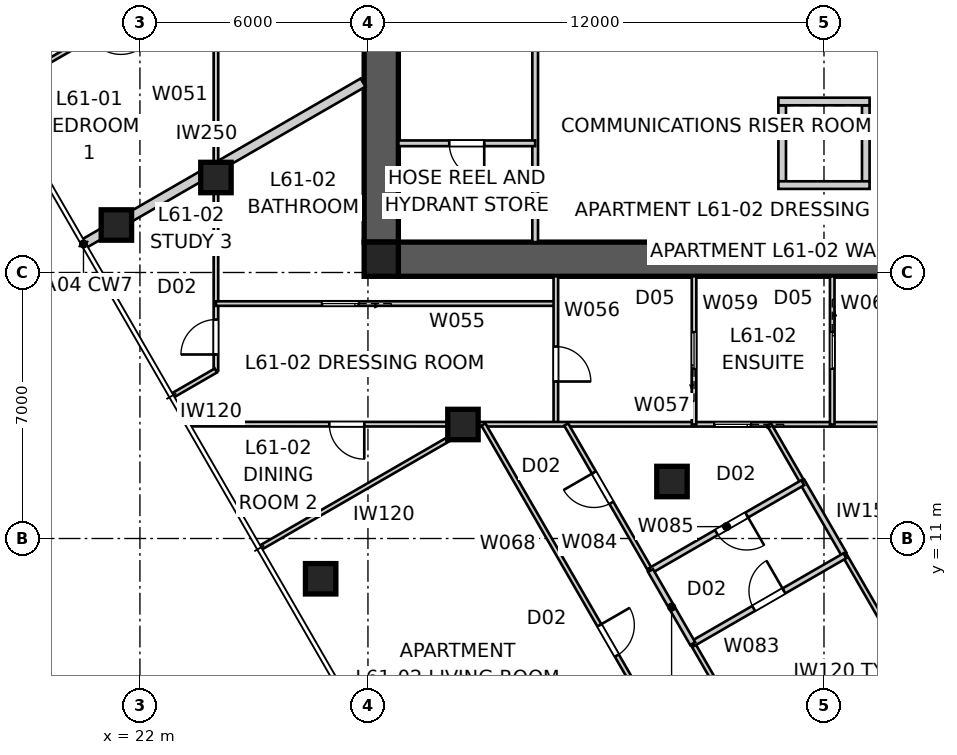
"""IFC4 building model, lengths in metres.
Left out: names, types, materials, properties, quantities, classifications, styles, units other than length and angle.
Written with IfcOpenShell. Run it as: python <this file> out.ifc"""

import sys

from ifc_helpers import new_model, si_unit, direction, frame, frame_2d, origin, origin_2d, place, context, subcontext, project, spatial, polyline, rectangle, outline, extrude, element, fill, save


model = new_model("IFC4")
c1 = context("Model", 3, precision=1e-05, world=origin(), true_north=direction((0.0, 1.0)))
c2 = subcontext(c1, "Body", "Model", "MODEL_VIEW")
j1 = project(units=[si_unit("LENGTHUNIT", "METRE"), si_unit("PLANEANGLEUNIT", "RADIAN")], contexts=[c1])
p1 = place(None, origin())
s1 = spatial("IfcSite", under=j1, at=p1, CompositionType="ELEMENT")
p2 = place(p1, origin())
s2 = spatial("IfcBuilding", under=s1, at=p2, CompositionType="ELEMENT")
p3 = place(p2, frame((0.0, 0.0, 221.8)))
s3 = spatial("IfcBuildingStorey", under=s2, at=p3, CompositionType="ELEMENT", Elevation=221.8)
p4 = place(p3, frame((51.2, 18.35, 0.0), z_axis=(0.0, 0.0, 1.0), x_axis=(-1.0, 0.0, 0.0)))
e1 = element("IfcWall", 1, at=p4, inside=s3, PredefinedType="SHEAR", context=c2, shape_type="SweptSolid", body=[
    extrude(outline(polyline([(0.0, -0.45), (22.4, -0.45), (22.4, -0.025), (22.85, -0.025), (22.85, 0.025), (22.4, 0.025), (22.4, 0.45), (0.0, 0.45), (0.0, 0.025), (-0.45, 0.025), (-0.45, -0.025), (0.0, -0.025), (0.0, -0.45)])), origin(), (0.0, 0.0, 1.0), 3.4),
])
p5 = place(p3, frame((28.35, 41.2, 0.0), z_axis=(0.0, 0.0, 1.0), x_axis=(0.0, -1.0, 0.0)))
e2 = element("IfcWall", 2, at=p5, inside=s3, PredefinedType="SHEAR", context=c2, shape_type="SweptSolid", body=[
    extrude(outline(polyline([(0.0, -0.45), (22.4, -0.45), (22.4, -0.025), (22.85, -0.025), (22.85, 0.025), (22.4, 0.025), (22.4, 0.45), (0.0, 0.45), (0.0, 0.025), (-0.45, 0.025), (-0.45, -0.025), (0.0, -0.025), (0.0, -0.45)])), origin(), (0.0, 0.0, 1.0), 3.4),
])
p6 = place(p5, frame((11.14, 0.0, 0.0)))
e3 = element("IfcOpeningElement", 3, at=p6, cuts=e2, PredefinedType="OPENING", context=c2, shape_type="SweptSolid", body=[
    extrude(rectangle(XDim=1.02, YDim=2.4, at=frame_2d((0.51, 1.2))), frame((0.0, 0.46, 0.0), z_axis=(0.0, -1.0, 0.0), x_axis=(1.0, 0.0, 0.0)), (0.0, 0.0, 1.0), 0.92),
])
for number, where, z_axis, x_axis in (
    (4, (38.9, 22.4, 0.0), (0.0, 0.0, 1.0), (0.0, -1.0, 0.0)),
    (5, (41.1, 22.4, 0.0), (0.0, 0.0, 1.0), (0.0, -1.0, 0.0)),
):
    element("IfcWall", number, at=place(p3, frame(where, z_axis=z_axis, x_axis=x_axis)), inside=s3, PredefinedType="SOLIDWALL", context=c2, shape_type="SweptSolid", body=[
        extrude(rectangle(XDim=2.0, YDim=0.2, at=frame_2d((1.0, 0.0))), origin(), (0.0, 0.0, 1.0), 3.4),
    ])
for number, where, z_axis, x_axis in (
    (6, (38.8, 22.5, 0.0), (0.0, 0.0, 1.0), (1.0, 0.0, 0.0)),
    (7, (38.8, 20.3, 0.0), (0.0, 0.0, 1.0), (1.0, 0.0, 0.0)),
):
    element("IfcWall", number, at=place(p3, frame(where, z_axis=z_axis, x_axis=x_axis)), inside=s3, PredefinedType="SOLIDWALL", context=c2, shape_type="SweptSolid", body=[
        extrude(rectangle(XDim=2.4, YDim=0.2, at=frame_2d((1.2, 0.0))), origin(), (0.0, 0.0, 1.0), 3.4),
    ])
p7 = place(p3, frame((28.35, 18.35, 0.0), z_axis=(0.0, 0.0, 1.0), x_axis=(1.0, 0.0, 0.0)))
e8 = element("IfcColumn", 8, at=p7, inside=s3, PredefinedType="COLUMN", context=c2, shape_type="SweptSolid", body=[
    extrude(rectangle(XDim=0.9, YDim=0.9, at=origin_2d()), origin(), (0.0, 0.0, 1.0), 3.4),
])
for number, where, z_axis, x_axis in (
    (9, (21.38, 19.25, 0.0), (0.0, 0.0, 1.0), (1.0, 0.0, 0.0)),
    (10, (26.755, 9.94, 0.0), (0.0, 0.0, 1.0), (1.0, 0.0, 0.0)),
    (11, (24.0, 20.5, 0.0), (0.0, 0.0, 1.0), (1.0, 0.0, 0.0)),
    (12, (30.5, 14.0, 0.0), (0.0, 0.0, 1.0), (1.0, 0.0, 0.0)),
    (13, (36.0, 12.5, 0.0), (0.0, 0.0, 1.0), (1.0, 0.0, 0.0)),
):
    element("IfcColumn", number, at=place(p3, frame(where, z_axis=z_axis, x_axis=x_axis)), inside=s3, PredefinedType="COLUMN", context=c2, shape_type="SweptSolid", body=[
        extrude(rectangle(XDim=0.8, YDim=0.8, at=origin_2d()), origin(), (0.0, 0.0, 1.0), 3.4),
    ])
p8 = place(p3, frame((20.514, 18.75, 0.0), z_axis=(0.0, 0.0, 1.0), x_axis=(0.866020489494, 0.500008511703, 0.0)))
e14 = element("IfcWall", 14, at=p8, inside=s3, PredefinedType="PARTITIONING", context=c2, shape_type="SweptSolid", body=[
    extrude(rectangle(XDim=8.496, YDim=0.25, at=frame_2d((4.248, 0.0))), origin(), (0.0, 0.0, 1.0), 3.25),
])
p9 = place(p3, frame((32.4, 18.8, 0.0), z_axis=(0.0, 0.0, 1.0), x_axis=(0.0, 1.0, 0.0)))
e15 = element("IfcWall", 15, at=p9, inside=s3, PredefinedType="SOLIDWALL", context=c2, shape_type="SweptSolid", body=[
    extrude(rectangle(XDim=5.9, YDim=0.15, at=frame_2d((2.95, 0.0))), origin(), (0.0, 0.0, 1.0), 3.25),
])
p10 = place(p3, frame((32.4, 21.4, 0.0), z_axis=(0.0, 0.0, 1.0), x_axis=(-1.0, 0.0, 0.0)))
e16 = element("IfcWall", 16, at=p10, inside=s3, PredefinedType="SOLIDWALL", context=c2, shape_type="SweptSolid", body=[
    extrude(rectangle(XDim=3.6, YDim=0.15, at=frame_2d((1.8, 0.0))), origin(), (0.0, 0.0, 1.0), 3.25),
])
p11 = place(p10, frame((1.34, 0.0, 0.0)))
e17 = element("IfcOpeningElement", 17, at=p11, cuts=e16, PredefinedType="OPENING", context=c2, shape_type="SweptSolid", body=[
    extrude(rectangle(XDim=0.92, YDim=2.1, at=frame_2d((0.46, 1.05))), frame((0.0, 0.085, 0.0), z_axis=(0.0, -1.0, 0.0), x_axis=(1.0, 0.0, 0.0)), (0.0, 0.0, 1.0), 0.17),
])
p12 = place(p3, frame((24.0, 15.422, 0.0), z_axis=(0.0, 0.0, 1.0), x_axis=(0.0, 1.0, 0.0)))
e18 = element("IfcWall", 18, at=p12, inside=s3, PredefinedType="PARTITIONING", context=c2, shape_type="SweptSolid", body=[
    extrude(rectangle(XDim=26.045, YDim=0.12, at=frame_2d((13.022, 0.0))), origin(), (0.0, 0.0, 1.0), 2.55),
])
p13 = place(p12, frame((13.139, 0.0, 0.0)))
e19 = element("IfcOpeningElement", 19, at=p13, cuts=e18, PredefinedType="OPENING", context=c2, shape_type="SweptSolid", body=[
    extrude(rectangle(XDim=0.92, YDim=2.34, at=frame_2d((0.46, 1.17))), frame((0.0, 0.07, 0.0), z_axis=(0.0, -1.0, 0.0), x_axis=(1.0, 0.0, 0.0)), (0.0, 0.0, 1.0), 0.14),
])
p14 = place(p12, frame((20.573, 0.0, 0.0)))
e20 = element("IfcOpeningElement", 20, at=p14, cuts=e18, PredefinedType="OPENING", context=c2, shape_type="SweptSolid", body=[
    extrude(rectangle(XDim=0.92, YDim=2.34, at=frame_2d((0.46, 1.17))), frame((0.0, 0.07, 0.0), z_axis=(0.0, -1.0, 0.0), x_axis=(1.0, 0.0, 0.0)), (0.0, 0.0, 1.0), 0.14),
])
p15 = place(p12, frame((0.42, 0.0, 0.0)))
e21 = element("IfcOpeningElement", 21, at=p15, cuts=e18, PredefinedType="OPENING", context=c2, shape_type="SweptSolid", body=[
    extrude(rectangle(XDim=0.92, YDim=2.34, at=frame_2d((0.46, 1.17))), frame((0.0, 0.07, 0.0), z_axis=(0.0, -1.0, 0.0), x_axis=(1.0, 0.0, 0.0)), (0.0, 0.0, 1.0), 0.14),
])
p16 = place(p3, frame((24.0, 26.103, 0.0), z_axis=(0.0, 0.0, 1.0), x_axis=(-0.866017585169, -0.500013541994, 0.0)))
e22 = element("IfcWall", 22, at=p16, inside=s3, PredefinedType="PARTITIONING", context=c2, shape_type="SweptSolid", body=[
    extrude(rectangle(XDim=6.655, YDim=0.12, at=frame_2d((3.328, 0.0))), origin(), (0.0, 0.0, 1.0), 3.25),
])
p17 = place(p16, frame((2.887, 0.0, 0.0)))
e23 = element("IfcOpeningElement", 23, at=p17, cuts=e22, PredefinedType="OPENING", context=c2, shape_type="SweptSolid", body=[
    extrude(rectangle(XDim=0.92, YDim=2.34, at=frame_2d((0.46, 1.17))), frame((0.0, 0.07, 0.0), z_axis=(0.0, -1.0, 0.0), x_axis=(1.0, 0.0, 0.0)), (0.0, 0.0, 1.0), 0.14),
])
p18 = place(p3, frame((32.944, 17.183, 0.0), z_axis=(0.0, 0.0, 1.0), x_axis=(-1.0, 0.0, 0.0)))
e24 = element("IfcWall", 24, at=p18, inside=s3, PredefinedType="PARTITIONING", context=c2, shape_type="SweptSolid", body=[
    extrude(rectangle(XDim=8.944, YDim=0.12, at=frame_2d((4.472, 0.0))), origin(), (0.0, 0.0, 1.0), 3.25),
])
p19 = place(p18, frame((5.192, 0.0, 0.0)))
e25 = element("IfcOpeningElement", 25, at=p19, cuts=e24, PredefinedType="OPENING", context=c2, shape_type="SweptSolid", body=[
    extrude(rectangle(XDim=0.96, YDim=2.1, at=frame_2d((0.48, 1.05))), frame((0.0, 0.07, 0.0), z_axis=(0.0, -1.0, 0.0), x_axis=(1.0, 0.0, 0.0)), (0.0, 0.0, 1.0), 0.14),
])
p20 = place(p3, frame((32.944, 17.9, 0.0), z_axis=(0.0, 0.0, 1.0), x_axis=(0.0, -1.0, 0.0)))
e26 = element("IfcWall", 26, at=p20, inside=s3, PredefinedType="PARTITIONING", context=c2, shape_type="SweptSolid", body=[
    extrude(rectangle(XDim=3.9, YDim=0.12, at=frame_2d((1.95, 0.0))), origin(), (0.0, 0.0, 1.0), 3.25),
])
p21 = place(p20, frame((1.849, 0.0, 0.0)))
e27 = element("IfcOpeningElement", 27, at=p21, cuts=e26, PredefinedType="OPENING", context=c2, shape_type="SweptSolid", body=[
    extrude(rectangle(XDim=0.92, YDim=2.34, at=frame_2d((0.46, 1.17))), frame((0.0, 0.07, 0.0), z_axis=(0.0, -1.0, 0.0), x_axis=(1.0, 0.0, 0.0)), (0.0, 0.0, 1.0), 0.14),
])
p22 = place(p3, frame((51.757, 14.0, 0.0), z_axis=(0.0, 0.0, 1.0), x_axis=(-0.999999938148, 0.000351716958, 0.0)))
e28 = element("IfcWall", 28, at=p22, inside=s3, PredefinedType="PARTITIONING", context=c2, shape_type="SweptSolid", body=[
    extrude(rectangle(XDim=28.46, YDim=0.12, at=frame_2d((14.23, 0.0))), origin(), (0.0, 0.0, 1.0), 2.55),
])
p23 = place(p22, frame((3.82, 0.0, 0.0)))
e29 = element("IfcOpeningElement", 29, at=p23, cuts=e28, PredefinedType="OPENING", context=c2, shape_type="SweptSolid", body=[
    extrude(rectangle(XDim=0.92, YDim=2.34, at=frame_2d((0.46, 1.17))), frame((0.0, 0.07, 0.0), z_axis=(0.0, -1.0, 0.0), x_axis=(1.0, 0.0, 0.0)), (0.0, 0.0, 1.0), 0.14),
])
p24 = place(p22, frame((9.17, 0.0, 0.0)))
e30 = element("IfcOpeningElement", 30, at=p24, cuts=e28, PredefinedType="OPENING", context=c2, shape_type="SweptSolid", body=[
    extrude(rectangle(XDim=0.96, YDim=2.1, at=frame_2d((0.48, 1.05))), frame((0.0, 0.07, 0.0), z_axis=(0.0, -1.0, 0.0), x_axis=(1.0, 0.0, 0.0)), (0.0, 0.0, 1.0), 0.14),
])
p25 = place(p22, frame((13.68, 0.0, 0.0)))
e31 = element("IfcOpeningElement", 31, at=p25, cuts=e28, PredefinedType="OPENING", context=c2, shape_type="SweptSolid", body=[
    extrude(rectangle(XDim=0.96, YDim=2.1, at=frame_2d((0.48, 1.05))), frame((0.0, 0.07, 0.0), z_axis=(0.0, -1.0, 0.0), x_axis=(1.0, 0.0, 0.0)), (0.0, 0.0, 1.0), 0.14),
])
p26 = place(p22, frame((23.854, 0.0, 0.0)))
e32 = element("IfcOpeningElement", 32, at=p26, cuts=e28, PredefinedType="OPENING", context=c2, shape_type="SweptSolid", body=[
    extrude(rectangle(XDim=0.92, YDim=2.34, at=frame_2d((0.46, 1.17))), frame((0.0, 0.07, 0.0), z_axis=(0.0, -1.0, 0.0), x_axis=(1.0, 0.0, 0.0)), (0.0, 0.0, 1.0), 0.14),
])
p27 = place(p3, frame((22.862, 14.765, 0.0), z_axis=(0.0, 0.0, 1.0), x_axis=(0.866040225545, 0.499974327079, 0.0)))
e33 = element("IfcWall", 33, at=p27, inside=s3, PredefinedType="PARTITIONING", context=c2, shape_type="SweptSolid", body=[
    extrude(rectangle(XDim=1.314, YDim=0.12, at=frame_2d((0.657, 0.0))), origin(), (0.0, 0.0, 1.0), 3.25),
])
p28 = place(p3, frame((36.581, 14.0, 0.0), z_axis=(0.0, 0.0, 1.0), x_axis=(0.0, 1.0, 0.0)))
e34 = element("IfcWall", 34, at=p28, inside=s3, PredefinedType="PARTITIONING", context=c2, shape_type="SweptSolid", body=[
    extrude(rectangle(XDim=3.9, YDim=0.12, at=frame_2d((1.95, 0.0))), origin(), (0.0, 0.0, 1.0), 3.25),
])
p29 = place(p28, frame((1.47, 0.0, 0.0)))
e35 = element("IfcOpeningElement", 35, at=p29, cuts=e34, PredefinedType="OPENING", context=c2, shape_type="SweptSolid", body=[
    extrude(rectangle(XDim=0.96, YDim=2.1, at=frame_2d((0.48, 1.05))), frame((0.0, 0.07, 0.0), z_axis=(0.0, -1.0, 0.0), x_axis=(1.0, 0.0, 0.0)), (0.0, 0.0, 1.0), 0.14),
])
p30 = place(p3, frame((40.217, 17.9, 0.0), z_axis=(0.0, 0.0, 1.0), x_axis=(0.0, -1.0, 0.0)))
e36 = element("IfcWall", 36, at=p30, inside=s3, PredefinedType="PARTITIONING", context=c2, shape_type="SweptSolid", body=[
    extrude(rectangle(XDim=3.9, YDim=0.12, at=frame_2d((1.95, 0.0))), origin(), (0.0, 0.0, 1.0), 3.25),
])
p31 = place(p30, frame((1.47, 0.0, 0.0)))
e37 = element("IfcOpeningElement", 37, at=p31, cuts=e36, PredefinedType="OPENING", context=c2, shape_type="SweptSolid", body=[
    extrude(rectangle(XDim=0.96, YDim=2.1, at=frame_2d((0.48, 1.05))), frame((0.0, 0.07, 0.0), z_axis=(0.0, -1.0, 0.0), x_axis=(1.0, 0.0, 0.0)), (0.0, 0.0, 1.0), 0.14),
])
p32 = place(p3, frame((31.039, 14.0, 0.0), z_axis=(0.0, 0.0, 1.0), x_axis=(0.500006184843, -0.866021832934, 0.0)))
e38 = element("IfcWall", 38, at=p32, inside=s3, PredefinedType="PARTITIONING", context=c2, shape_type="SweptSolid", body=[
    extrude(rectangle(XDim=13.084, YDim=0.12, at=frame_2d((6.542, 0.0))), origin(), (0.0, 0.0, 1.0), 3.25),
])
p33 = place(p32, frame((6.102, 0.0, 0.0)))
e39 = element("IfcOpeningElement", 39, at=p33, cuts=e38, PredefinedType="OPENING", context=c2, shape_type="SweptSolid", body=[
    extrude(rectangle(XDim=0.92, YDim=2.34, at=frame_2d((0.46, 1.17))), frame((0.0, 0.07, 0.0), z_axis=(0.0, -1.0, 0.0), x_axis=(1.0, 0.0, 0.0)), (0.0, 0.0, 1.0), 0.14),
])
p34 = place(p3, frame((25.174, 10.759, 0.0), z_axis=(0.0, 0.0, 1.0), x_axis=(0.866023120914, 0.500003954026, 0.0)))
e40 = element("IfcWall", 40, at=p34, inside=s3, PredefinedType="PARTITIONING", context=c2, shape_type="SweptSolid", body=[
    extrude(rectangle(XDim=6.481, YDim=0.12, at=frame_2d((3.241, 0.0))), origin(), (0.0, 0.0, 1.0), 3.25),
])
p35 = place(p3, frame((43.219, 5.924, 0.0), z_axis=(0.0, 0.0, 1.0), x_axis=(-0.500003544594, 0.866023357302, 0.0)))
e41 = element("IfcWall", 41, at=p35, inside=s3, PredefinedType="PARTITIONING", context=c2, shape_type="SweptSolid", body=[
    extrude(rectangle(XDim=5.388, YDim=0.12, at=frame_2d((2.694, 0.0))), origin(), (0.0, 0.0, 1.0), 3.25),
])
p36 = place(p3, frame((39.416, 12.512, 0.0), z_axis=(0.0, 0.0, 1.0), x_axis=(-0.500005339912, 0.866022320763, 0.0)))
e42 = element("IfcWall", 42, at=p36, inside=s3, PredefinedType="PARTITIONING", context=c2, shape_type="SweptSolid", body=[
    extrude(rectangle(XDim=1.718, YDim=0.12, at=frame_2d((0.859, 0.0))), origin(), (0.0, 0.0, 1.0), 3.25),
])
p37 = place(p3, frame((40.525, 10.59, 0.0), z_axis=(0.0, 0.0, 1.0), x_axis=(-0.499973265211, 0.866040838572, 0.0)))
e43 = element("IfcWall", 43, at=p37, inside=s3, PredefinedType="SOLIDWALL", context=c2, shape_type="SweptSolid", body=[
    extrude(rectangle(XDim=2.219, YDim=0.15, at=frame_2d((1.109, 0.0))), origin(), (0.0, 0.0, 1.0), 3.25),
])
p38 = place(p3, frame((39.214, 3.612, 0.0), z_axis=(0.0, 0.0, 1.0), x_axis=(-0.499995631649, 0.866027925839, 0.0)))
e44 = element("IfcWall", 44, at=p38, inside=s3, PredefinedType="PARTITIONING", context=c2, shape_type="SweptSolid", body=[
    extrude(rectangle(XDim=5.338, YDim=0.12, at=frame_2d((2.669, 0.0))), origin(), (0.0, 0.0, 1.0), 3.25),
])
p39 = place(p3, frame((36.545, 8.234, 0.0), z_axis=(0.0, 0.0, 1.0), x_axis=(0.866025598446, 0.499999662836, 0.0)))
e45 = element("IfcWall", 45, at=p39, inside=s3, PredefinedType="SOLIDWALL", context=c2, shape_type="SweptSolid", body=[
    extrude(rectangle(XDim=4.625, YDim=0.15, at=frame_2d((2.312, 0.0))), origin(), (0.0, 0.0, 1.0), 3.25),
])
p40 = place(p39, frame((1.853, 0.0, 0.0)))
e46 = element("IfcOpeningElement", 46, at=p40, cuts=e45, PredefinedType="OPENING", context=c2, shape_type="SweptSolid", body=[
    extrude(rectangle(XDim=0.92, YDim=2.34, at=frame_2d((0.46, 1.17))), frame((0.0, 0.085, 0.0), z_axis=(0.0, -1.0, 0.0), x_axis=(1.0, 0.0, 0.0)), (0.0, 0.0, 1.0), 0.17),
])
p41 = place(p3, frame((35.435, 10.156, 0.0), z_axis=(0.0, 0.0, 1.0), x_axis=(-0.499966886051, 0.866044521288, 0.0)))
e47 = element("IfcWall", 47, at=p41, inside=s3, PredefinedType="PARTITIONING", context=c2, shape_type="SweptSolid", body=[
    extrude(rectangle(XDim=4.438, YDim=0.12, at=frame_2d((2.219, 0.0))), origin(), (0.0, 0.0, 1.0), 3.25),
])
p42 = place(p41, frame((2.059, 0.0, 0.0)))
e48 = element("IfcOpeningElement", 48, at=p42, cuts=e47, PredefinedType="OPENING", context=c2, shape_type="SweptSolid", body=[
    extrude(rectangle(XDim=0.92, YDim=2.34, at=frame_2d((0.46, 1.17))), frame((0.0, 0.07, 0.0), z_axis=(0.0, -1.0, 0.0), x_axis=(1.0, 0.0, 0.0)), (0.0, 0.0, 1.0), 0.14),
])
p43 = place(p3, frame((39.441, 12.469, 0.0), z_axis=(0.0, 0.0, 1.0), x_axis=(-0.866025598446, -0.499999662836, 0.0)))
e49 = element("IfcWall", 49, at=p43, inside=s3, PredefinedType="SOLIDWALL", context=c2, shape_type="SweptSolid", body=[
    extrude(rectangle(XDim=4.625, YDim=0.15, at=frame_2d((2.312, 0.0))), origin(), (0.0, 0.0, 1.0), 3.25),
])
p44 = place(p43, frame((1.702, 0.0, 0.0)))
e50 = element("IfcOpeningElement", 50, at=p44, cuts=e49, PredefinedType="OPENING", context=c2, shape_type="SweptSolid", body=[
    extrude(rectangle(XDim=0.92, YDim=2.34, at=frame_2d((0.46, 1.17))), frame((0.0, 0.085, 0.0), z_axis=(0.0, -1.0, 0.0), x_axis=(1.0, 0.0, 0.0)), (0.0, 0.0, 1.0), 0.17),
])
p45 = place(p3, frame((35.435, 10.156, 0.0), z_axis=(0.0, 0.0, 1.0), x_axis=(0.500008142102, -0.866020702889, 0.0)))
e51 = element("IfcWall", 51, at=p45, inside=s3, PredefinedType="SOLIDWALL", context=c2, shape_type="SweptSolid", body=[
    extrude(rectangle(XDim=2.219, YDim=0.15, at=frame_2d((1.11, 0.0))), origin(), (0.0, 0.0, 1.0), 3.25),
])
p46 = place(p11, origin())
e52 = element("IfcDoor", 52, at=p46, inside=s3, OperationType="SINGLE_SWING_LEFT", PredefinedType="DOOR", context=c2, shape_type="SweptSolid", body=[
    extrude(rectangle(XDim=0.92, YDim=2.1, at=frame_2d((0.46, 1.05))), frame((0.0, 0.025, 0.0), z_axis=(0.0, -1.0, 0.0), x_axis=(1.0, 0.0, 0.0)), (0.0, 0.0, 1.0), 0.05),
])
fill(e17, e52)
p47 = place(p31, origin())
e53 = element("IfcDoor", 53, at=p47, inside=s3, OperationType="SLIDING_TO_LEFT", PredefinedType="DOOR", context=c2, shape_type="SweptSolid", body=[
    extrude(rectangle(XDim=0.96, YDim=2.1, at=frame_2d((0.48, 1.05))), frame((0.0, 0.025, 0.0), z_axis=(0.0, -1.0, 0.0), x_axis=(1.0, 0.0, 0.0)), (0.0, 0.0, 1.0), 0.05),
])
fill(e37, e53)
p48 = place(p29, origin())
e54 = element("IfcDoor", 54, at=p48, inside=s3, OperationType="SLIDING_TO_LEFT", PredefinedType="DOOR", context=c2, shape_type="SweptSolid", body=[
    extrude(rectangle(XDim=0.96, YDim=2.1, at=frame_2d((0.48, 1.05))), frame((0.0, 0.025, 0.0), z_axis=(0.0, -1.0, 0.0), x_axis=(1.0, 0.0, 0.0)), (0.0, 0.0, 1.0), 0.05),
])
fill(e35, e54)
p49 = place(p25, origin())
e55 = element("IfcDoor", 55, at=p49, inside=s3, OperationType="SLIDING_TO_LEFT", PredefinedType="DOOR", context=c2, shape_type="SweptSolid", body=[
    extrude(rectangle(XDim=0.96, YDim=2.1, at=frame_2d((0.48, 1.05))), frame((0.0, 0.025, 0.0), z_axis=(0.0, -1.0, 0.0), x_axis=(1.0, 0.0, 0.0)), (0.0, 0.0, 1.0), 0.05),
])
fill(e31, e55)
p50 = place(p21, origin())
e56 = element("IfcDoor", 56, at=p50, inside=s3, OperationType="SINGLE_SWING_RIGHT", PredefinedType="DOOR", context=c2, shape_type="SweptSolid", body=[
    extrude(rectangle(XDim=0.92, YDim=2.34, at=frame_2d((0.46, 1.17))), frame((0.0, 0.025, 0.0), z_axis=(0.0, -1.0, 0.0), x_axis=(1.0, 0.0, 0.0)), (0.0, 0.0, 1.0), 0.05),
])
fill(e27, e56)
p51 = place(p44, origin())
e57 = element("IfcDoor", 57, at=p51, inside=s3, OperationType="SINGLE_SWING_LEFT", PredefinedType="DOOR", context=c2, shape_type="SweptSolid", body=[
    extrude(rectangle(XDim=0.92, YDim=2.34, at=frame_2d((0.46, 1.17))), frame((0.0, 0.025, 0.0), z_axis=(0.0, -1.0, 0.0), x_axis=(1.0, 0.0, 0.0)), (0.0, 0.0, 1.0), 0.05),
])
fill(e50, e57)
p52 = place(p42, origin())
e58 = element("IfcDoor", 58, at=p52, inside=s3, OperationType="SINGLE_SWING_RIGHT", PredefinedType="DOOR", context=c2, shape_type="SweptSolid", body=[
    extrude(rectangle(XDim=0.92, YDim=2.34, at=frame_2d((0.46, 1.17))), frame((0.0, 0.025, 0.0), z_axis=(0.0, -1.0, 0.0), x_axis=(1.0, 0.0, 0.0)), (0.0, 0.0, 1.0), 0.05),
])
fill(e48, e58)
p53 = place(p19, origin())
e59 = element("IfcDoor", 59, at=p53, inside=s3, OperationType="SLIDING_TO_LEFT", PredefinedType="DOOR", context=c2, shape_type="SweptSolid", body=[
    extrude(rectangle(XDim=0.96, YDim=2.1, at=frame_2d((0.48, 1.05))), frame((0.0, 0.025, 0.0), z_axis=(0.0, -1.0, 0.0), x_axis=(1.0, 0.0, 0.0)), (0.0, 0.0, 1.0), 0.05),
])
fill(e25, e59)
p54 = place(p26, origin())
e60 = element("IfcDoor", 60, at=p54, inside=s3, OperationType="SINGLE_SWING_LEFT", PredefinedType="DOOR", context=c2, shape_type="SweptSolid", body=[
    extrude(rectangle(XDim=0.92, YDim=2.34, at=frame_2d((0.46, 1.17))), frame((0.0, 0.025, 0.0), z_axis=(0.0, -1.0, 0.0), x_axis=(1.0, 0.0, 0.0)), (0.0, 0.0, 1.0), 0.05),
])
fill(e32, e60)
p55 = place(p15, origin())
e61 = element("IfcDoor", 61, at=p55, inside=s3, OperationType="SINGLE_SWING_LEFT", PredefinedType="DOOR", context=c2, shape_type="SweptSolid", body=[
    extrude(rectangle(XDim=0.92, YDim=2.34, at=frame_2d((0.46, 1.17))), frame((0.0, 0.025, 0.0), z_axis=(0.0, -1.0, 0.0), x_axis=(1.0, 0.0, 0.0)), (0.0, 0.0, 1.0), 0.05),
])
fill(e21, e61)
p56 = place(p40, origin())
e62 = element("IfcDoor", 62, at=p56, inside=s3, OperationType="SINGLE_SWING_RIGHT", PredefinedType="DOOR", context=c2, shape_type="SweptSolid", body=[
    extrude(rectangle(XDim=0.92, YDim=2.34, at=frame_2d((0.46, 1.17))), frame((0.0, 0.025, 0.0), z_axis=(0.0, -1.0, 0.0), x_axis=(1.0, 0.0, 0.0)), (0.0, 0.0, 1.0), 0.05),
])
fill(e46, e62)
p57 = place(p33, origin())
e63 = element("IfcDoor", 63, at=p57, inside=s3, OperationType="SINGLE_SWING_LEFT", PredefinedType="DOOR", context=c2, shape_type="SweptSolid", body=[
    extrude(rectangle(XDim=0.92, YDim=2.34, at=frame_2d((0.46, 1.17))), frame((0.0, 0.025, 0.0), z_axis=(0.0, -1.0, 0.0), x_axis=(1.0, 0.0, 0.0)), (0.0, 0.0, 1.0), 0.05),
])
fill(e39, e63)
save(model, sys.argv[1])
